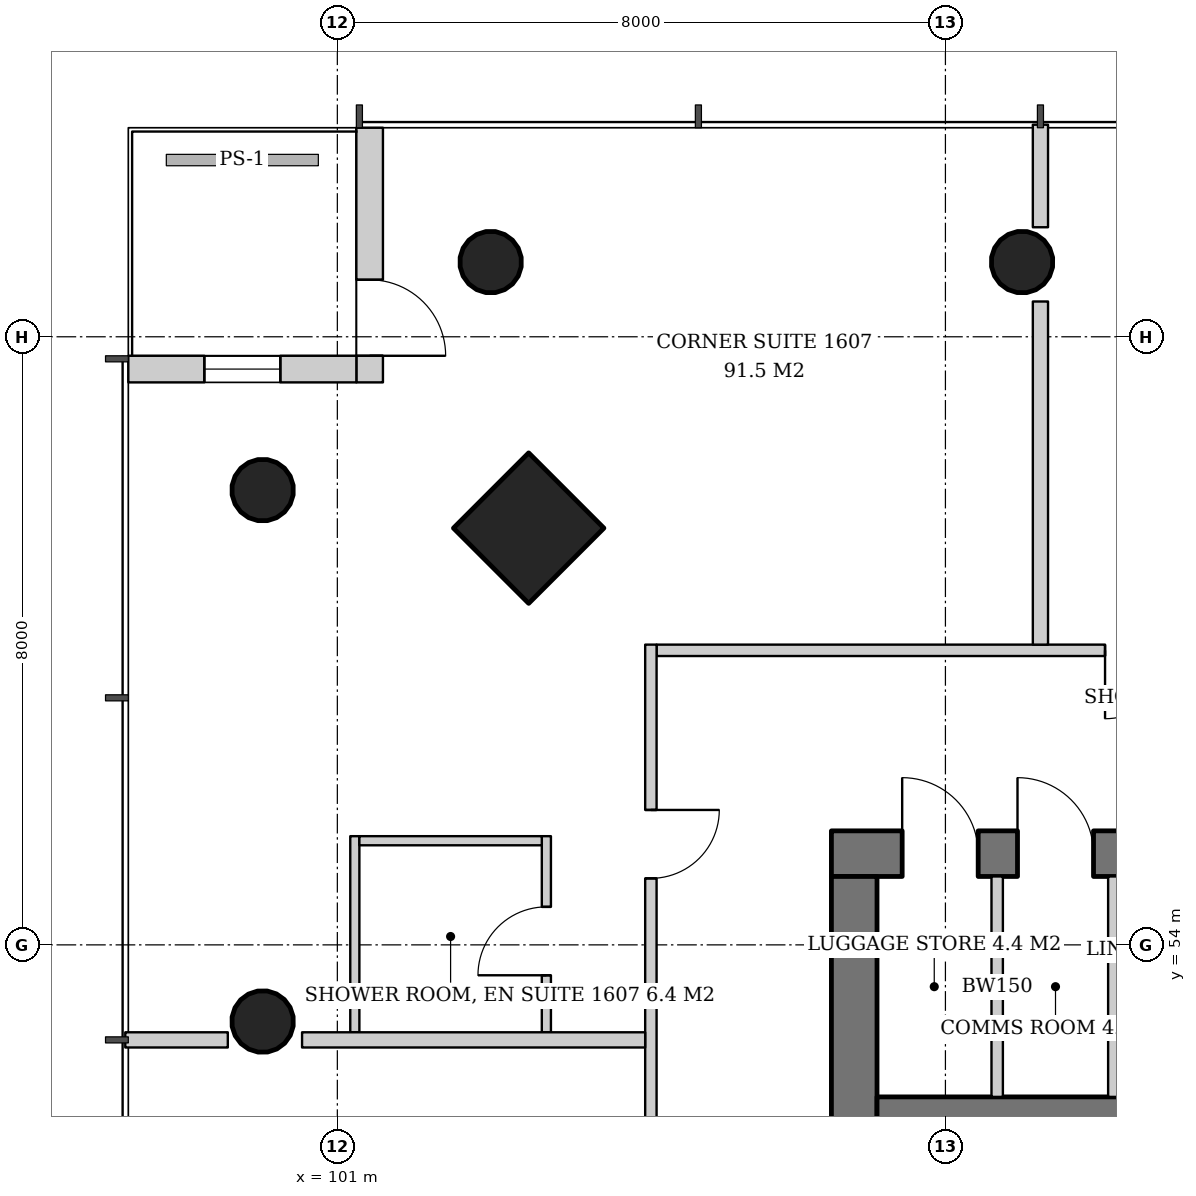
"""IFC4 building model, lengths in metres.
Left out: names, types, materials, properties, quantities, classifications, styles, units other than length and angle.
Written with IfcOpenShell. Run it as: python <this file> out.ifc"""

import sys

from ifc_helpers import new_model, si_unit, direction, frame, frame_2d, origin, origin_2d, place, context, subcontext, project, spatial, rectangle, hollow_circle, extrude, element, fill, save


model = new_model("IFC4")
c1 = context("Model", 3, precision=1e-05, world=origin(), true_north=direction((0.0, 1.0)))
c2 = subcontext(c1, "Body", "Model", "MODEL_VIEW")
j1 = project(units=[si_unit("LENGTHUNIT", "METRE"), si_unit("PLANEANGLEUNIT", "RADIAN")], contexts=[c1])
p1 = place(None, origin())
s1 = spatial("IfcSite", under=j1, at=p1, CompositionType="ELEMENT")
p2 = place(p1, origin())
s2 = spatial("IfcBuilding", under=s1, at=p2, CompositionType="ELEMENT")
p3 = place(p2, frame((0.0, 0.0, 66.6)))
s3 = spatial("IfcBuildingStorey", under=s2, at=p3, CompositionType="ELEMENT", Elevation=66.6)
p4 = place(p3, frame((103.466, 59.534, 0.0), z_axis=(0.043032401563, -0.043032401563, 0.998146494675), x_axis=(0.707106781187, 0.707106781187, 0.0)))
e1 = element("IfcColumn", 1, at=p4, inside=s3, PredefinedType="COLUMN", context=c2, shape_type="SweptSolid", body=[
    extrude(rectangle(XDim=1.4, YDim=1.4, at=origin_2d()), origin(), (0.0, 0.0, 1.0), 3.807),
])
p5 = place(p3, frame((102.966, 63.034, 0.0), z_axis=(0.043032401563, -0.043032401563, 0.998146494675), x_axis=(0.707106781187, 0.707106781187, 0.0)))
e2 = element("IfcColumn", 2, at=p5, inside=s3, PredefinedType="COLUMN", context=c2, shape_type="SweptSolid", body=[
    extrude(hollow_circle(Radius=0.406, WallThickness=0.03, at=origin_2d()), origin(), (0.0, 0.0, 1.0), 3.807),
])
p6 = place(p3, frame((109.983, 63.034, 0.0), z_axis=(0.021563230905, -0.043062285527, 0.998839660125), x_axis=(0.894160516368, 0.44774654769, 0.0)))
e3 = element("IfcColumn", 3, at=p6, inside=s3, PredefinedType="COLUMN", context=c2, shape_type="SweptSolid", body=[
    extrude(hollow_circle(Radius=0.406, WallThickness=0.03, at=origin_2d()), origin(), (0.0, 0.0, 1.0), 3.804),
])
p7 = place(p3, frame((99.966, 60.034, 0.0), z_axis=(0.043032401563, -0.043032401563, 0.998146494675), x_axis=(0.707106781187, 0.707106781187, 0.0)))
e4 = element("IfcColumn", 4, at=p7, inside=s3, PredefinedType="COLUMN", context=c2, shape_type="SweptSolid", body=[
    extrude(hollow_circle(Radius=0.406, WallThickness=0.03, at=origin_2d()), origin(), (0.0, 0.0, 1.0), 3.807),
])
p8 = place(p3, frame((99.966, 53.017, 0.0), z_axis=(0.043062285527, -0.021563230905, 0.998839660125), x_axis=(0.44774654769, 0.894160516368, 0.0)))
e5 = element("IfcColumn", 5, at=p8, inside=s3, PredefinedType="COLUMN", context=c2, shape_type="SweptSolid", body=[
    extrude(hollow_circle(Radius=0.406, WallThickness=0.03, at=origin_2d()), origin(), (0.0, 0.0, 1.0), 3.804),
])
p9 = place(p3, frame((107.5, 55.2, 0.0), z_axis=(0.0, 0.0, 1.0), x_axis=(1.0, 0.0, 0.0)))
e6 = element("IfcWall", 6, at=p9, inside=s3, PredefinedType="SHEAR", context=c2, shape_type="SweptSolid", body=[
    extrude(rectangle(XDim=19.0, YDim=0.6, at=frame_2d((9.5, 0.0))), origin(), (0.0, 0.0, 1.0), 3.8),
])
p10 = place(p9, frame((14.14, 0.0, 0.0)))
e7 = element("IfcOpeningElement", 7, at=p10, cuts=e6, PredefinedType="OPENING", context=c2, shape_type="SweptSolid", body=[
    extrude(rectangle(XDim=1.0, YDim=2.1, at=frame_2d((0.5, 1.05))), frame((0.0, 0.31, 0.0), z_axis=(0.0, -1.0, 0.0), x_axis=(1.0, 0.0, 0.0)), (0.0, 0.0, 1.0), 0.62),
])
p11 = place(p9, frame((0.931, 0.0, 0.0)))
e8 = element("IfcOpeningElement", 8, at=p11, cuts=e6, PredefinedType="OPENING", context=c2, shape_type="SweptSolid", body=[
    extrude(rectangle(XDim=1.0, YDim=2.1, at=frame_2d((0.5, 1.05))), frame((0.0, 0.31, 0.0), z_axis=(0.0, -1.0, 0.0), x_axis=(1.0, 0.0, 0.0)), (0.0, 0.0, 1.0), 0.62),
])
p12 = place(p9, frame((2.448, 0.0, 0.0)))
e9 = element("IfcOpeningElement", 9, at=p12, cuts=e6, PredefinedType="OPENING", context=c2, shape_type="SweptSolid", body=[
    extrude(rectangle(XDim=1.0, YDim=2.1, at=frame_2d((0.5, 1.05))), frame((0.0, 0.31, 0.0), z_axis=(0.0, -1.0, 0.0), x_axis=(1.0, 0.0, 0.0)), (0.0, 0.0, 1.0), 0.62),
])
p13 = place(p9, frame((3.983, 0.0, 0.0)))
e10 = element("IfcOpeningElement", 10, at=p13, cuts=e6, PredefinedType="OPENING", context=c2, shape_type="SweptSolid", body=[
    extrude(rectangle(XDim=1.0, YDim=2.1, at=frame_2d((0.5, 1.05))), frame((0.0, 0.31, 0.0), z_axis=(0.0, -1.0, 0.0), x_axis=(1.0, 0.0, 0.0)), (0.0, 0.0, 1.0), 0.62),
])
p14 = place(p3, frame((107.8, 37.1, 0.0), z_axis=(0.0, 0.0, 1.0), x_axis=(0.0, 1.0, 0.0)))
e11 = element("IfcWall", 11, at=p14, inside=s3, PredefinedType="SHEAR", context=c2, shape_type="SweptSolid", body=[
    extrude(rectangle(XDim=17.8, YDim=0.6, at=frame_2d((8.9, 0.0))), origin(), (0.0, 0.0, 1.0), 3.8),
])
p15 = place(p14, frame((8.0, 0.0, 0.0)))
e12 = element("IfcOpeningElement", 12, at=p15, cuts=e11, PredefinedType="OPENING", context=c2, shape_type="SweptSolid", body=[
    extrude(rectangle(XDim=1.8, YDim=2.4, at=frame_2d((0.9, 1.2))), frame((0.0, 0.31, 0.0), z_axis=(0.0, -1.0, 0.0), x_axis=(1.0, 0.0, 0.0)), (0.0, 0.0, 1.0), 0.62),
])
p16 = place(p3, frame((108.1, 51.8, 0.0), z_axis=(0.0, 0.0, 1.0), x_axis=(1.0, 0.0, 0.0)))
e13 = element("IfcWall", 13, at=p16, inside=s3, PredefinedType="SHEAR", context=c2, shape_type="SweptSolid", body=[
    extrude(rectangle(XDim=17.8, YDim=0.4, at=frame_2d((8.9, 0.0))), origin(), (0.0, 0.0, 1.0), 3.8),
])
p17 = place(p3, frame((101.425, 64.75, 0.0), z_axis=(0.0, 0.0, 1.0), x_axis=(0.0, -1.0, 0.0)))
e14 = element("IfcWall", 14, at=p17, inside=s3, PredefinedType="SOLIDWALL", context=c2, shape_type="SweptSolid", body=[
    extrude(rectangle(XDim=3.35, YDim=0.35, at=frame_2d((1.675, 0.0))), origin(), (0.0, 0.0, 1.0), 3.6),
])
p18 = place(p17, frame((2.0, 0.0, 0.0)))
e15 = element("IfcOpeningElement", 15, at=p18, cuts=e14, PredefinedType="OPENING", context=c2, shape_type="SweptSolid", body=[
    extrude(rectangle(XDim=1.0, YDim=2.4, at=frame_2d((0.5, 1.2))), frame((0.0, 0.185, 0.0), z_axis=(0.0, -1.0, 0.0), x_axis=(1.0, 0.0, 0.0)), (0.0, 0.0, 1.0), 0.37),
])
p19 = place(p3, frame((101.25, 61.575, 0.0), z_axis=(0.0, 0.0, 1.0), x_axis=(-1.0, 0.0, 0.0)))
e16 = element("IfcWall", 16, at=p19, inside=s3, PredefinedType="SOLIDWALL", context=c2, shape_type="SweptSolid", body=[
    extrude(rectangle(XDim=3.0, YDim=0.35, at=frame_2d((1.5, 0.0))), origin(), (0.0, 0.0, 1.0), 3.6),
])
p20 = place(p19, frame((1.0, 0.0, 0.9)))
e17 = element("IfcOpeningElement", 17, at=p20, cuts=e16, PredefinedType="OPENING", context=c2, shape_type="SweptSolid", body=[
    extrude(rectangle(XDim=1.0, YDim=2.4, at=frame_2d((0.5, 1.2))), frame((0.0, 0.185, 0.0), z_axis=(0.0, -1.0, 0.0), x_axis=(1.0, 0.0, 0.0)), (0.0, 0.0, 1.0), 0.37),
])
for number, where, z_axis, x_axis in (
    (18, (109.681, 52.0, 0.0), (0.0, 0.0, 1.0), (0.0, 1.0, 0.0)),
    (19, (111.216, 52.0, 0.0), (0.0, 0.0, 1.0), (0.0, 1.0, 0.0)),
):
    element("IfcWall", number, at=place(p3, frame(where, z_axis=z_axis, x_axis=x_axis)), inside=s3, PredefinedType="SOLIDWALL", context=c2, shape_type="SweptSolid", body=[
        extrude(rectangle(XDim=2.9, YDim=0.15, at=frame_2d((1.45, 0.0))), origin(), (0.0, 0.0, 1.0), 3.6),
    ])
p21 = place(p3, frame((128.95, 57.875, 0.0), z_axis=(0.0, 0.0, 1.0), x_axis=(-1.0, 0.0, 0.0)))
e20 = element("IfcWall", 20, at=p21, inside=s3, PredefinedType="PARTITIONING", context=c2, shape_type="SweptSolid", body=[
    extrude(rectangle(XDim=23.75, YDim=0.15, at=frame_2d((11.875, 0.0))), origin(), (0.0, 0.0, 1.0), 2.8),
])
p22 = place(p21, frame((2.175, 0.0, 0.0)))
e21 = element("IfcOpeningElement", 21, at=p22, cuts=e20, PredefinedType="OPENING", context=c2, shape_type="SweptSolid", body=[
    extrude(rectangle(XDim=0.9, YDim=2.1, at=frame_2d((0.45, 1.05))), frame((0.0, 0.085, 0.0), z_axis=(0.0, -1.0, 0.0), x_axis=(1.0, 0.0, 0.0)), (0.0, 0.0, 1.0), 0.17),
])
p23 = place(p21, frame((7.95, 0.0, 0.0)))
e22 = element("IfcOpeningElement", 22, at=p23, cuts=e20, PredefinedType="OPENING", context=c2, shape_type="SweptSolid", body=[
    extrude(rectangle(XDim=0.9, YDim=2.1, at=frame_2d((0.45, 1.05))), frame((0.0, 0.085, 0.0), z_axis=(0.0, -1.0, 0.0), x_axis=(1.0, 0.0, 0.0)), (0.0, 0.0, 1.0), 0.17),
])
p24 = place(p21, frame((10.55, 0.0, 0.0)))
e23 = element("IfcOpeningElement", 23, at=p24, cuts=e20, PredefinedType="OPENING", context=c2, shape_type="SweptSolid", body=[
    extrude(rectangle(XDim=0.9, YDim=2.1, at=frame_2d((0.45, 1.05))), frame((0.0, 0.085, 0.0), z_axis=(0.0, -1.0, 0.0), x_axis=(1.0, 0.0, 0.0)), (0.0, 0.0, 1.0), 0.17),
])
p25 = place(p21, frame((16.95, 0.0, 0.0)))
e24 = element("IfcOpeningElement", 24, at=p25, cuts=e20, PredefinedType="OPENING", context=c2, shape_type="SweptSolid", body=[
    extrude(rectangle(XDim=0.9, YDim=2.1, at=frame_2d((0.45, 1.05))), frame((0.0, 0.085, 0.0), z_axis=(0.0, -1.0, 0.0), x_axis=(1.0, 0.0, 0.0)), (0.0, 0.0, 1.0), 0.17),
])
p26 = place(p3, frame((110.25, 57.95, 0.0), z_axis=(0.0, 0.0, 1.0), x_axis=(0.0, 1.0, 0.0)))
e25 = element("IfcWall", 25, at=p26, inside=s3, PredefinedType="PARTITIONING", context=c2, shape_type="SweptSolid", body=[
    extrude(rectangle(XDim=4.514, YDim=0.2, at=frame_2d((2.257, 0.0))), origin(), (0.0, 0.0, 1.0), 3.6),
])
p27 = place(p3, frame((110.25, 63.441, 0.0), z_axis=(0.0, 0.0, 1.0), x_axis=(0.0, 1.0, 0.0)))
e26 = element("IfcWall", 26, at=p27, inside=s3, PredefinedType="PARTITIONING", context=c2, shape_type="SweptSolid", body=[
    extrude(rectangle(XDim=1.349, YDim=0.2, at=frame_2d((0.675, 0.0))), origin(), (0.0, 0.0, 1.0), 3.6),
])
p28 = place(p3, frame((103.75, 52.85, 0.0), z_axis=(0.0, 0.0, 1.0), x_axis=(0.0, 1.0, 0.0)))
e27 = element("IfcWall", 27, at=p28, inside=s3, PredefinedType="PARTITIONING", context=c2, shape_type="SweptSolid", body=[
    extrude(rectangle(XDim=2.58, YDim=0.12, at=frame_2d((1.29, 0.0))), origin(), (0.0, 0.0, 1.0), 2.8),
])
p29 = place(p28, frame((0.75, 0.0, 0.0)))
e28 = element("IfcOpeningElement", 28, at=p29, cuts=e27, PredefinedType="OPENING", context=c2, shape_type="SweptSolid", body=[
    extrude(rectangle(XDim=0.9, YDim=2.1, at=frame_2d((0.45, 1.05))), frame((0.0, 0.07, 0.0), z_axis=(0.0, -1.0, 0.0), x_axis=(1.0, 0.0, 0.0)), (0.0, 0.0, 1.0), 0.14),
])
p30 = place(p3, frame((101.23, 52.85, 0.0), z_axis=(0.0, 0.0, 1.0), x_axis=(0.0, 1.0, 0.0)))
e29 = element("IfcWall", 29, at=p30, inside=s3, PredefinedType="PARTITIONING", context=c2, shape_type="SweptSolid", body=[
    extrude(rectangle(XDim=2.58, YDim=0.12, at=frame_2d((1.29, 0.0))), origin(), (0.0, 0.0, 1.0), 2.8),
])
p31 = place(p3, frame((103.69, 55.37, 0.0), z_axis=(0.0, 0.0, 1.0), x_axis=(-1.0, 0.0, 0.0)))
e30 = element("IfcWall", 30, at=p31, inside=s3, PredefinedType="PARTITIONING", context=c2, shape_type="SweptSolid", body=[
    extrude(rectangle(XDim=2.4, YDim=0.12, at=frame_2d((1.2, 0.0))), origin(), (0.0, 0.0, 1.0), 2.8),
])
p32 = place(p3, frame((105.125, 57.95, 0.0), z_axis=(0.0, 0.0, 1.0), x_axis=(0.0, -1.0, 0.0)))
e31 = element("IfcWall", 31, at=p32, inside=s3, PredefinedType="PARTITIONING", context=c2, shape_type="SweptSolid", body=[
    extrude(rectangle(XDim=23.75, YDim=0.15, at=frame_2d((11.875, 0.0))), origin(), (0.0, 0.0, 1.0), 2.8),
])
p33 = place(p32, frame((2.175, 0.0, 0.0)))
e32 = element("IfcOpeningElement", 32, at=p33, cuts=e31, PredefinedType="OPENING", context=c2, shape_type="SweptSolid", body=[
    extrude(rectangle(XDim=0.9, YDim=2.1, at=frame_2d((0.45, 1.05))), frame((0.0, 0.085, 0.0), z_axis=(0.0, -1.0, 0.0), x_axis=(1.0, 0.0, 0.0)), (0.0, 0.0, 1.0), 0.17),
])
p34 = place(p32, frame((7.9, 0.0, 0.0)))
e33 = element("IfcOpeningElement", 33, at=p34, cuts=e31, PredefinedType="OPENING", context=c2, shape_type="SweptSolid", body=[
    extrude(rectangle(XDim=1.0, YDim=2.1, at=frame_2d((0.5, 1.05))), frame((0.0, 0.085, 0.0), z_axis=(0.0, -1.0, 0.0), x_axis=(1.0, 0.0, 0.0)), (0.0, 0.0, 1.0), 0.17),
])
p35 = place(p32, frame((12.45, 0.0, 0.0)))
e34 = element("IfcOpeningElement", 34, at=p35, cuts=e31, PredefinedType="OPENING", context=c2, shape_type="SweptSolid", body=[
    extrude(rectangle(XDim=0.9, YDim=2.1, at=frame_2d((0.45, 1.05))), frame((0.0, 0.085, 0.0), z_axis=(0.0, -1.0, 0.0), x_axis=(1.0, 0.0, 0.0)), (0.0, 0.0, 1.0), 0.17),
])
p36 = place(p3, frame((105.05, 52.75, 0.0), z_axis=(0.0, 0.0, 1.0), x_axis=(-1.0, 0.0, 0.0)))
e35 = element("IfcWall", 35, at=p36, inside=s3, PredefinedType="PARTITIONING", context=c2, shape_type="SweptSolid", body=[
    extrude(rectangle(XDim=4.514, YDim=0.2, at=frame_2d((2.257, 0.0))), origin(), (0.0, 0.0, 1.0), 3.6),
])
p37 = place(p3, frame((99.559, 52.75, 0.0), z_axis=(0.0, 0.0, 1.0), x_axis=(-1.0, 0.0, 0.0)))
e36 = element("IfcWall", 36, at=p37, inside=s3, PredefinedType="PARTITIONING", context=c2, shape_type="SweptSolid", body=[
    extrude(rectangle(XDim=1.349, YDim=0.2, at=frame_2d((0.675, 0.0))), origin(), (0.0, 0.0, 1.0), 3.6),
])
p38 = place(p18, origin())
e37 = element("IfcDoor", 37, at=p38, inside=s3, OperationType="SINGLE_SWING_RIGHT", PredefinedType="DOOR", context=c2, shape_type="SweptSolid", body=[
    extrude(rectangle(XDim=1.0, YDim=2.4, at=frame_2d((0.5, 1.2))), frame((0.0, 0.025, 0.0), z_axis=(0.0, -1.0, 0.0), x_axis=(1.0, 0.0, 0.0)), (0.0, 0.0, 1.0), 0.05),
])
fill(e15, e37)
p39 = place(p20, origin())
e38 = element("IfcWindow", 38, at=p39, inside=s3, PartitioningType="SINGLE_PANEL", PredefinedType="WINDOW", context=c2, shape_type="SweptSolid", body=[
    extrude(rectangle(XDim=1.0, YDim=2.4, at=frame_2d((0.5, 1.2))), frame((0.0, 0.03, 0.0), z_axis=(0.0, -1.0, 0.0), x_axis=(1.0, 0.0, 0.0)), (0.0, 0.0, 1.0), 0.06),
])
fill(e17, e38)
p40 = place(p11, origin())
e39 = element("IfcDoor", 39, at=p40, inside=s3, OperationType="SINGLE_SWING_LEFT", PredefinedType="DOOR", context=c2, shape_type="SweptSolid", body=[
    extrude(rectangle(XDim=1.0, YDim=2.1, at=frame_2d((0.5, 1.05))), frame((0.0, -0.24, 0.0), z_axis=(0.0, -1.0, 0.0), x_axis=(1.0, 0.0, 0.0)), (0.0, 0.0, 1.0), 0.05),
])
fill(e8, e39)
p41 = place(p12, origin())
e40 = element("IfcDoor", 40, at=p41, inside=s3, OperationType="SINGLE_SWING_LEFT", PredefinedType="DOOR", context=c2, shape_type="SweptSolid", body=[
    extrude(rectangle(XDim=1.0, YDim=2.1, at=frame_2d((0.5, 1.05))), frame((0.0, -0.24, 0.0), z_axis=(0.0, -1.0, 0.0), x_axis=(1.0, 0.0, 0.0)), (0.0, 0.0, 1.0), 0.05),
])
fill(e9, e40)
p42 = place(p25, origin())
e41 = element("IfcDoor", 41, at=p42, inside=s3, OperationType="SINGLE_SWING_RIGHT", PredefinedType="DOOR", context=c2, shape_type="SweptSolid", body=[
    extrude(rectangle(XDim=0.9, YDim=2.1, at=frame_2d((0.45, 1.05))), frame((0.0, 0.025, 0.0), z_axis=(0.0, -1.0, 0.0), x_axis=(1.0, 0.0, 0.0)), (0.0, 0.0, 1.0), 0.05),
])
fill(e24, e41)
p43 = place(p29, origin())
e42 = element("IfcDoor", 42, at=p43, inside=s3, OperationType="SINGLE_SWING_LEFT", PredefinedType="DOOR", context=c2, shape_type="SweptSolid", body=[
    extrude(rectangle(XDim=0.9, YDim=2.1, at=frame_2d((0.45, 1.05))), frame((0.0, 0.025, 0.0), z_axis=(0.0, -1.0, 0.0), x_axis=(1.0, 0.0, 0.0)), (0.0, 0.0, 1.0), 0.05),
])
fill(e28, e42)
p44 = place(p33, origin())
e43 = element("IfcDoor", 43, at=p44, inside=s3, OperationType="SINGLE_SWING_LEFT", PredefinedType="DOOR", context=c2, shape_type="SweptSolid", body=[
    extrude(rectangle(XDim=0.9, YDim=2.1, at=frame_2d((0.45, 1.05))), frame((0.0, 0.025, 0.0), z_axis=(0.0, -1.0, 0.0), x_axis=(1.0, 0.0, 0.0)), (0.0, 0.0, 1.0), 0.05),
])
fill(e32, e43)
save(model, sys.argv[1])
